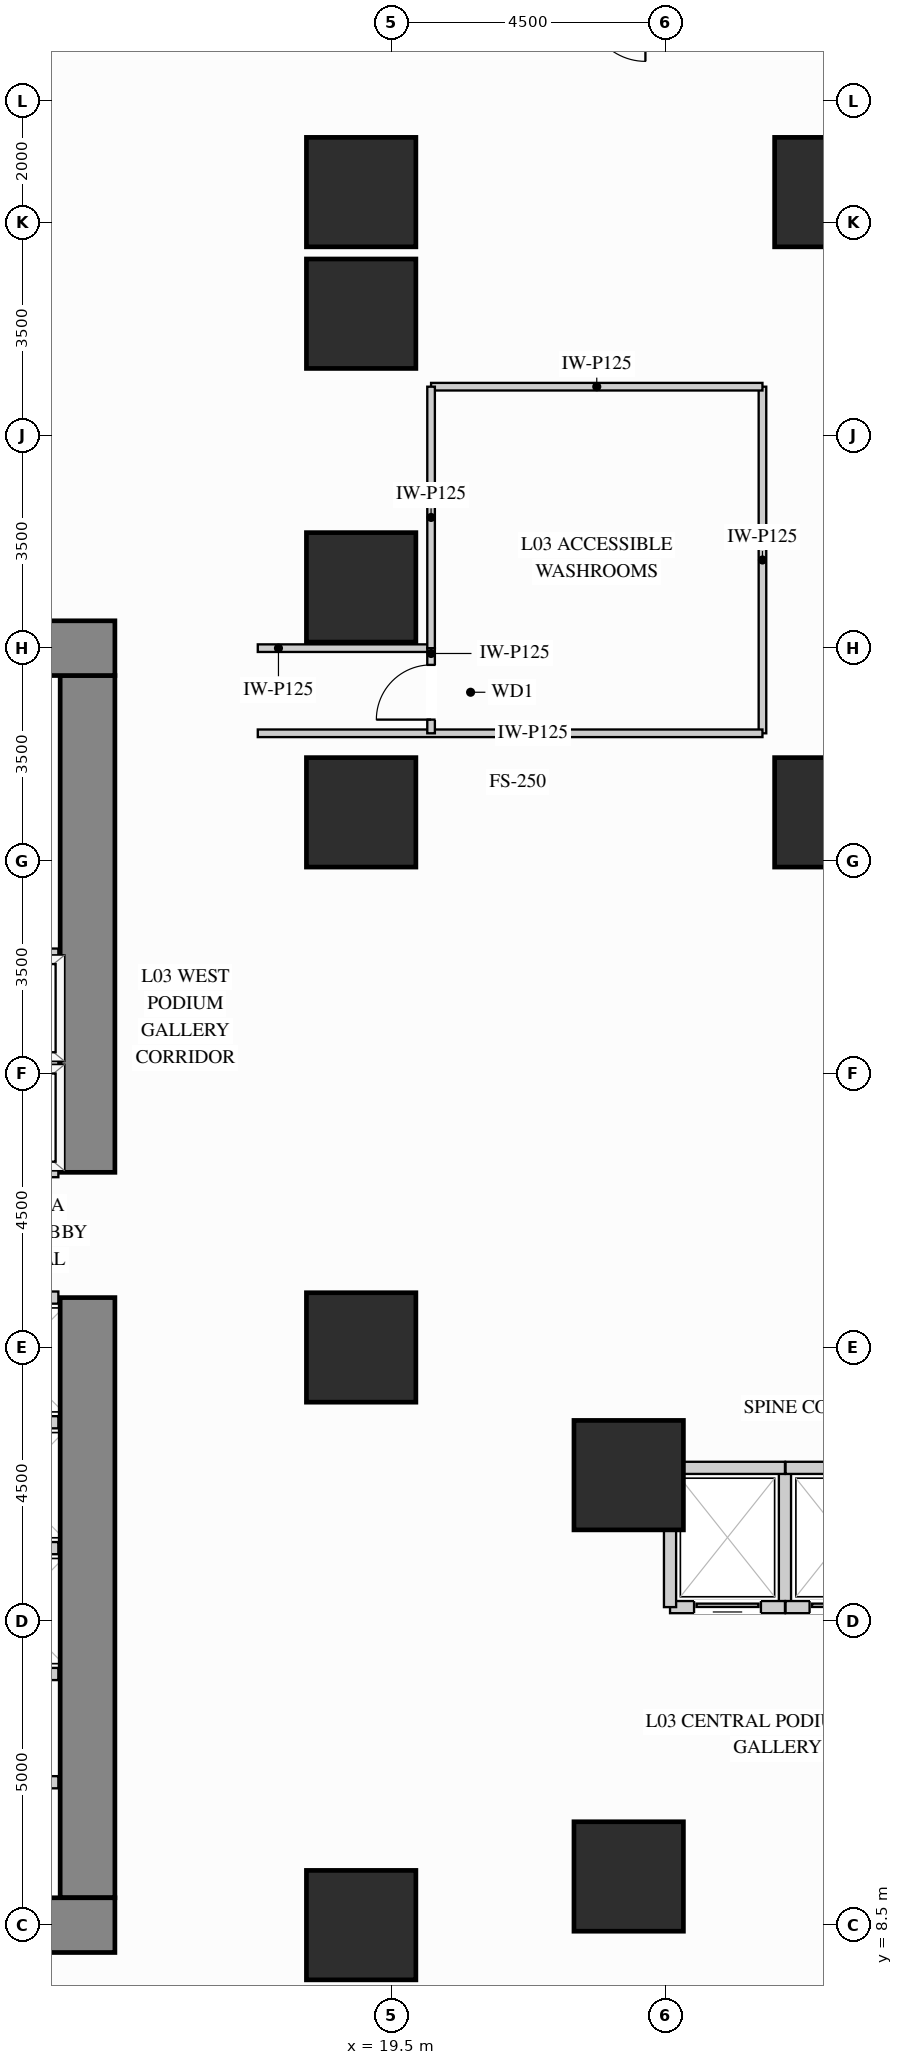
"""IFC4 building model, lengths in metres.
Left out: names, types, materials, properties, quantities, classifications, styles, units other than length and angle.
Written with IfcOpenShell. Run it as: python <this file> out.ifc"""

import sys

from ifc_helpers import new_model, si_unit, direction, frame, frame_2d, origin, origin_2d, place, context, subcontext, project, spatial, rectangle, extrude, source, transform, mapped, element, fill, save


model = new_model("IFC4")
c1 = context("Model", 3, precision=1e-05, world=origin(), true_north=direction((0.0, 1.0)))
c2 = subcontext(c1, "Body", "Model", "MODEL_VIEW")
j1 = project(units=[si_unit("LENGTHUNIT", "METRE"), si_unit("PLANEANGLEUNIT", "RADIAN")], contexts=[c1])
p1 = place(None, origin())
s1 = spatial("IfcSite", under=j1, at=p1, CompositionType="ELEMENT")
p2 = place(p1, origin())
s2 = spatial("IfcBuilding", under=s1, at=p2, CompositionType="ELEMENT")
p3 = place(p2, frame((0.0, 0.0, 13.5)))
s3 = spatial("IfcBuildingStorey", under=s2, at=p3, CompositionType="ELEMENT", Elevation=13.5)
m1 = source(origin(), c2, "Body", "SweptSolid", [
    extrude(rectangle(XDim=1.8, YDim=1.8, at=origin_2d()), origin(), (0.0, 0.0, 1.0), 4.15),
])
for number, where, z_axis, x_axis in (
    (1, (26.7, 26.8, 0.0), (0.0, 0.0, 1.0), (1.0, 0.0, 0.0)),
    (2, (26.7, 37.0, 0.0), (0.0, 0.0, 1.0), (1.0, 0.0, 0.0)),
    (3, (19.0, 8.5, 0.0), (0.0, 0.0, 1.0), (1.0, 0.0, 0.0)),
    (4, (19.0, 18.0, 0.0), (0.0, 0.0, 1.0), (1.0, 0.0, 0.0)),
    (5, (19.0, 26.8, 0.0), (0.0, 0.0, 1.0), (1.0, 0.0, 0.0)),
    (6, (19.0, 30.5, 0.0), (0.0, 0.0, 1.0), (1.0, 0.0, 0.0)),
    (7, (19.0, 35.0, 0.0), (0.0, 0.0, 1.0), (1.0, 0.0, 0.0)),
    (8, (19.0, 37.0, 0.0), (0.0, 0.0, 1.0), (1.0, 0.0, 0.0)),
    (9, (23.4, 9.3, 0.0), (0.0, 0.0, 1.0), (1.0, 0.0, 0.0)),
    (10, (23.4, 15.9, 0.0), (0.0, 0.0, 1.0), (1.0, 0.0, 0.0)),
):
    element("IfcColumn", number, at=place(p3, frame(where, z_axis=z_axis, x_axis=x_axis)), inside=s3, PredefinedType="COLUMN", context=c2, shape_type="MappedRepresentation", body=[
        mapped(m1, transform((0.0, 0.0, 0.0), x_axis=(1.0, 0.0, 0.0), y_axis=(0.0, 1.0, 0.0), z_axis=(0.0, 0.0, 1.0))),
    ])
m2 = source(origin(), c2, "Body", "SweptSolid", [
    extrude(rectangle(XDim=9.87, YDim=0.9, at=frame_2d((4.935, 0.0))), origin(), (0.0, 0.0, 1.0), 4.15),
])
p4 = place(p3, frame((14.5, 8.95, 0.0), z_axis=(0.0, 0.0, 1.0), x_axis=(0.0, 1.0, 0.0)))
e11 = element("IfcWall", 11, at=p4, inside=s3, PredefinedType="SHEAR", context=c2, shape_type="MappedRepresentation", body=[
    mapped(m2, transform((0.0, 0.0, 0.0), x_axis=(1.0, 0.0, 0.0), y_axis=(0.0, 1.0, 0.0), z_axis=(0.0, 0.0, 1.0))),
])
m3 = source(origin(), c2, "Body", "SweptSolid", [
    extrude(rectangle(XDim=8.17, YDim=0.9, at=frame_2d((4.085, 0.0))), origin(), (0.0, 0.0, 1.0), 4.15),
])
p5 = place(p3, frame((14.5, 20.88, 0.0), z_axis=(0.0, 0.0, 1.0), x_axis=(0.0, 1.0, 0.0)))
e12 = element("IfcWall", 12, at=p5, inside=s3, PredefinedType="SHEAR", context=c2, shape_type="MappedRepresentation", body=[
    mapped(m3, transform((0.0, 0.0, 0.0), x_axis=(1.0, 0.0, 0.0), y_axis=(0.0, 1.0, 0.0), z_axis=(0.0, 0.0, 1.0))),
])
m4 = source(origin(), c2, "Body", "SweptSolid", [
    extrude(rectangle(XDim=10.9, YDim=0.9, at=frame_2d((5.45, 0.0))), origin(), (0.0, 0.0, 1.0), 4.15),
])
for number, where, z_axis, x_axis in (
    (13, (4.05, 29.5, 0.0), (0.0, 0.0, 1.0), (1.0, 0.0, 0.0)),
    (14, (4.05, 8.5, 0.0), (0.0, 0.0, 1.0), (1.0, 0.0, 0.0)),
):
    element("IfcWall", number, at=place(p3, frame(where, z_axis=z_axis, x_axis=x_axis)), inside=s3, PredefinedType="SHEAR", context=c2, shape_type="MappedRepresentation", body=[
        mapped(m4, transform((0.0, 0.0, 0.0), x_axis=(1.0, 0.0, 0.0), y_axis=(0.0, 1.0, 0.0), z_axis=(0.0, 0.0, 1.0))),
    ])
m5 = source(origin(), c2, "Body", "SweptSolid", [
    extrude(rectangle(XDim=5.7, YDim=0.125, at=frame_2d((2.85, 0.0))), origin(), (0.0, 0.0, 1.0), 4.135),
])
p6 = place(p3, frame((25.6, 28.1, 0.0), z_axis=(0.0, 0.0, 1.0), x_axis=(0.0, 1.0, 0.0)))
e15 = element("IfcWall", 15, at=p6, inside=s3, PredefinedType="PARTITIONING", context=c2, shape_type="MappedRepresentation", body=[
    mapped(m5, transform((0.0, 0.0, 0.0), x_axis=(1.0, 0.0, 0.0), y_axis=(0.0, 1.0, 0.0), z_axis=(0.0, 0.0, 1.0))),
])
m6 = source(origin(), c2, "Body", "SweptSolid", [
    extrude(rectangle(XDim=2.85, YDim=0.125, at=frame_2d((1.425, 0.0))), origin(), (0.0, 0.0, 1.0), 4.135),
])
p7 = place(p3, frame((17.3, 29.5, 0.0), z_axis=(0.0, 0.0, 1.0), x_axis=(1.0, 0.0, 0.0)))
e16 = element("IfcWall", 16, at=p7, inside=s3, PredefinedType="PARTITIONING", context=c2, shape_type="MappedRepresentation", body=[
    mapped(m6, transform((0.0, 0.0, 0.0), x_axis=(1.0, 0.0, 0.0), y_axis=(0.0, 1.0, 0.0), z_axis=(0.0, 0.0, 1.0))),
])
m7 = source(origin(), c2, "Body", "SweptSolid", [
    extrude(rectangle(XDim=5.45, YDim=0.125, at=frame_2d((2.725, 0.0))), origin(), (0.0, 0.0, 1.0), 4.135),
])
p8 = place(p3, frame((20.15, 33.8, 0.0), z_axis=(0.0, 0.0, 1.0), x_axis=(1.0, 0.0, 0.0)))
e17 = element("IfcWall", 17, at=p8, inside=s3, PredefinedType="PARTITIONING", context=c2, shape_type="MappedRepresentation", body=[
    mapped(m7, transform((0.0, 0.0, 0.0), x_axis=(1.0, 0.0, 0.0), y_axis=(0.0, 1.0, 0.0), z_axis=(0.0, 0.0, 1.0))),
])
m8 = source(origin(), c2, "Body", "SweptSolid", [
    extrude(rectangle(XDim=8.3, YDim=0.125, at=frame_2d((4.15, 0.0))), origin(), (0.0, 0.0, 1.0), 4.135),
])
p9 = place(p3, frame((17.3, 28.1, 0.0), z_axis=(0.0, 0.0, 1.0), x_axis=(1.0, 0.0, 0.0)))
e18 = element("IfcWall", 18, at=p9, inside=s3, PredefinedType="PARTITIONING", context=c2, shape_type="MappedRepresentation", body=[
    mapped(m8, transform((0.0, 0.0, 0.0), x_axis=(1.0, 0.0, 0.0), y_axis=(0.0, 1.0, 0.0), z_axis=(0.0, 0.0, 1.0))),
])
m9 = source(origin(), c2, "Body", "SweptSolid", [
    extrude(rectangle(XDim=4.3, YDim=0.125, at=frame_2d((2.15, 0.0))), origin(), (0.0, 0.0, 1.0), 4.135),
])
p10 = place(p3, frame((20.15, 29.5, 0.0), z_axis=(0.0, 0.0, 1.0), x_axis=(0.0, 1.0, 0.0)))
e19 = element("IfcWall", 19, at=p10, inside=s3, PredefinedType="PARTITIONING", context=c2, shape_type="MappedRepresentation", body=[
    mapped(m9, transform((0.0, 0.0, 0.0), x_axis=(1.0, 0.0, 0.0), y_axis=(0.0, 1.0, 0.0), z_axis=(0.0, 0.0, 1.0))),
])
p11 = place(p3, frame((20.15, 28.1, 0.0), z_axis=(0.0, 0.0, 1.0), x_axis=(0.0, 1.0, 0.0)))
e20 = element("IfcWall", 20, at=p11, inside=s3, PredefinedType="PARTITIONING", context=c2, shape_type="SweptSolid", body=[
    extrude(rectangle(XDim=1.4, YDim=0.125, at=frame_2d((0.7, 0.0))), origin(), (0.0, 0.0, 1.0), 4.135),
])
p12 = place(p11, frame((0.225, 0.0, 0.0)))
e21 = element("IfcOpeningElement", 21, at=p12, cuts=e20, PredefinedType="OPENING", context=c2, shape_type="SweptSolid", body=[
    extrude(rectangle(XDim=0.9, YDim=2.15, at=frame_2d((0.45, 1.075))), frame((0.0, 0.073, 0.0), z_axis=(0.0, -1.0, 0.0), x_axis=(1.0, 0.0, 0.0)), (0.0, 0.0, 1.0), 0.145),
])
m10 = source(origin(), c2, "Body", "SweptSolid", [
    extrude(rectangle(XDim=1.6, YDim=0.2, at=frame_2d((0.8, 0.0))), origin(), (0.0, 0.0, 1.0), 4.135),
])
p13 = place(p3, frame((12.42, 10.85, 0.0), z_axis=(0.0, 0.0, 1.0), x_axis=(1.0, 0.0, 0.0)))
e22 = element("IfcWall", 22, at=p13, inside=s3, PredefinedType="PARTITIONING", context=c2, shape_type="MappedRepresentation", body=[
    mapped(m10, transform((0.0, 0.0, 0.0), x_axis=(1.0, 0.0, 0.0), y_axis=(0.0, 1.0, 0.0), z_axis=(0.0, 0.0, 1.0))),
])
m11 = source(origin(), c2, "Body", "SweptSolid", [
    extrude(rectangle(XDim=2.19, YDim=0.2, at=frame_2d((1.095, 0.0))), origin(), (0.0, 0.0, 1.0), 4.135),
])
for number, where, z_axis, x_axis in (
    (23, (11.83, 22.66, 0.0), (0.0, 0.0, 1.0), (1.0, 0.0, 0.0)),
    (24, (11.83, 20.9, 0.0), (0.0, 0.0, 1.0), (1.0, 0.0, 0.0)),
    (25, (11.83, 24.46, 0.0), (0.0, 0.0, 1.0), (1.0, 0.0, 0.0)),
):
    element("IfcWall", number, at=place(p3, frame(where, z_axis=z_axis, x_axis=x_axis)), inside=s3, PredefinedType="PARTITIONING", context=c2, shape_type="MappedRepresentation", body=[
        mapped(m11, transform((0.0, 0.0, 0.0), x_axis=(1.0, 0.0, 0.0), y_axis=(0.0, 1.0, 0.0), z_axis=(0.0, 0.0, 1.0))),
    ])
m12 = source(origin(), c2, "Body", "SweptSolid", [
    extrude(rectangle(XDim=1.79, YDim=0.2, at=frame_2d((0.895, 0.0))), origin(), (0.0, 0.0, 1.0), 4.135),
])
for number, where, z_axis, x_axis in (
    (26, (12.23, 14.7, 0.0), (0.0, 0.0, 1.0), (1.0, 0.0, 0.0)),
    (27, (12.23, 12.63, 0.0), (0.0, 0.0, 1.0), (1.0, 0.0, 0.0)),
    (28, (12.23, 16.77, 0.0), (0.0, 0.0, 1.0), (1.0, 0.0, 0.0)),
    (29, (12.23, 18.82, 0.0), (0.0, 0.0, 1.0), (1.0, 0.0, 0.0)),
):
    element("IfcWall", number, at=place(p3, frame(where, z_axis=z_axis, x_axis=x_axis)), inside=s3, PredefinedType="PARTITIONING", context=c2, shape_type="MappedRepresentation", body=[
        mapped(m12, transform((0.0, 0.0, 0.0), x_axis=(1.0, 0.0, 0.0), y_axis=(0.0, 1.0, 0.0), z_axis=(0.0, 0.0, 1.0))),
    ])
m13 = source(origin(), c2, "Body", "SweptSolid", [
    extrude(rectangle(XDim=2.29, YDim=0.2, at=frame_2d((1.145, 0.0))), origin(), (0.0, 0.0, 1.0), 4.135),
])
p14 = place(p3, frame((25.97, 13.73, 0.0), z_axis=(0.0, 0.0, 1.0), x_axis=(0.0, 1.0, 0.0)))
e30 = element("IfcWall", 30, at=p14, inside=s3, PredefinedType="PARTITIONING", context=c2, shape_type="MappedRepresentation", body=[
    mapped(m13, transform((0.0, 0.0, 0.0), x_axis=(1.0, 0.0, 0.0), y_axis=(0.0, 1.0, 0.0), z_axis=(0.0, 0.0, 1.0))),
])
m14 = source(origin(), c2, "Body", "SweptSolid", [
    extrude(rectangle(XDim=1.89, YDim=0.2, at=frame_2d((0.945, 0.0))), origin(), (0.0, 0.0, 1.0), 4.135),
])
p15 = place(p3, frame((24.08, 16.02, 0.0), z_axis=(0.0, 0.0, 1.0), x_axis=(1.0, 0.0, 0.0)))
e31 = element("IfcWall", 31, at=p15, inside=s3, PredefinedType="PARTITIONING", context=c2, shape_type="MappedRepresentation", body=[
    mapped(m14, transform((0.0, 0.0, 0.0), x_axis=(1.0, 0.0, 0.0), y_axis=(0.0, 1.0, 0.0), z_axis=(0.0, 0.0, 1.0))),
])
p16 = place(p3, frame((24.08, 13.73, 0.0), z_axis=(0.0, 0.0, 1.0), x_axis=(1.0, 0.0, 0.0)))
e32 = element("IfcWall", 32, at=p16, inside=s3, PredefinedType="PARTITIONING", context=c2, shape_type="SweptSolid", body=[
    extrude(rectangle(XDim=1.89, YDim=0.2, at=frame_2d((0.945, 0.0))), origin(), (0.0, 0.0, 1.0), 4.135),
])
p17 = place(p16, frame((0.395, 0.0, 0.0)))
e33 = element("IfcOpeningElement", 33, at=p17, cuts=e32, PredefinedType="OPENING", context=c2, shape_type="SweptSolid", body=[
    extrude(rectangle(XDim=1.1, YDim=2.2, at=frame_2d((0.55, 1.1))), frame((0.0, 0.11, 0.0), z_axis=(0.0, -1.0, 0.0), x_axis=(1.0, 0.0, 0.0)), (0.0, 0.0, 1.0), 0.22),
])
p18 = place(p3, frame((24.08, 13.73, 0.0), z_axis=(0.0, 0.0, 1.0), x_axis=(0.0, 1.0, 0.0)))
e34 = element("IfcWall", 34, at=p18, inside=s3, PredefinedType="PARTITIONING", context=c2, shape_type="MappedRepresentation", body=[
    mapped(m13, transform((0.0, 0.0, 0.0), x_axis=(1.0, 0.0, 0.0), y_axis=(0.0, 1.0, 0.0), z_axis=(0.0, 0.0, 1.0))),
])
m15 = source(origin(), c2, "Body", "SweptSolid", [
    extrude(rectangle(XDim=1.89, YDim=0.2, at=frame_2d((0.945, 0.0))), origin(), (0.0, 0.0, 1.0), 4.135),
])
p19 = place(p3, frame((25.98, 16.02, 0.0), z_axis=(0.0, 0.0, 1.0), x_axis=(1.0, 0.0, 0.0)))
e35 = element("IfcWall", 35, at=p19, inside=s3, PredefinedType="PARTITIONING", context=c2, shape_type="MappedRepresentation", body=[
    mapped(m15, transform((0.0, 0.0, 0.0), x_axis=(1.0, 0.0, 0.0), y_axis=(0.0, 1.0, 0.0), z_axis=(0.0, 0.0, 1.0))),
])
p20 = place(p3, frame((25.98, 13.73, 0.0), z_axis=(0.0, 0.0, 1.0), x_axis=(1.0, 0.0, 0.0)))
e36 = element("IfcWall", 36, at=p20, inside=s3, PredefinedType="PARTITIONING", context=c2, shape_type="SweptSolid", body=[
    extrude(rectangle(XDim=1.89, YDim=0.2, at=frame_2d((0.945, 0.0))), origin(), (0.0, 0.0, 1.0), 4.135),
])
p21 = place(p20, frame((0.395, 0.0, 0.0)))
e37 = element("IfcOpeningElement", 37, at=p21, cuts=e36, PredefinedType="OPENING", context=c2, shape_type="SweptSolid", body=[
    extrude(rectangle(XDim=1.1, YDim=2.2, at=frame_2d((0.55, 1.1))), frame((0.0, 0.11, 0.0), z_axis=(0.0, -1.0, 0.0), x_axis=(1.0, 0.0, 0.0)), (0.0, 0.0, 1.0), 0.22),
])
m16 = source(origin(), c2, "Body", "SweptSolid", [
    extrude(rectangle(XDim=1.1, YDim=2.2, at=frame_2d((0.55, 1.1))), frame((0.0, 0.025, 0.0), z_axis=(0.0, -1.0, 0.0), x_axis=(1.0, 0.0, 0.0)), (0.0, 0.0, 1.0), 0.05),
])
p22 = place(p17, origin())
e38 = element("IfcDoor", 38, at=p22, inside=s3, OperationType="SLIDING_TO_LEFT", PredefinedType="DOOR", context=c2, shape_type="MappedRepresentation", body=[
    mapped(m16, transform((0.0, 0.0, 0.0), x_axis=(1.0, 0.0, 0.0), y_axis=(0.0, 1.0, 0.0), z_axis=(0.0, 0.0, 1.0))),
])
fill(e33, e38)
p23 = place(p21, origin())
e39 = element("IfcDoor", 39, at=p23, inside=s3, OperationType="SLIDING_TO_LEFT", PredefinedType="DOOR", context=c2, shape_type="MappedRepresentation", body=[
    mapped(m16, transform((0.0, 0.0, 0.0), x_axis=(1.0, 0.0, 0.0), y_axis=(0.0, 1.0, 0.0), z_axis=(0.0, 0.0, 1.0))),
])
fill(e37, e39)
m17 = source(origin(), c2, "Body", "SweptSolid", [
    extrude(rectangle(XDim=0.9, YDim=2.15, at=frame_2d((0.45, 1.075))), frame((0.0, 0.025, 0.0), z_axis=(0.0, -1.0, 0.0), x_axis=(1.0, 0.0, 0.0)), (0.0, 0.0, 1.0), 0.05),
])
p24 = place(p12, origin())
e40 = element("IfcDoor", 40, at=p24, inside=s3, OperationType="SINGLE_SWING_LEFT", PredefinedType="DOOR", context=c2, shape_type="MappedRepresentation", body=[
    mapped(m17, transform((0.0, 0.0, 0.0), x_axis=(1.0, 0.0, 0.0), y_axis=(0.0, 1.0, 0.0), z_axis=(0.0, 0.0, 1.0))),
])
fill(e21, e40)
save(model, sys.argv[1])
